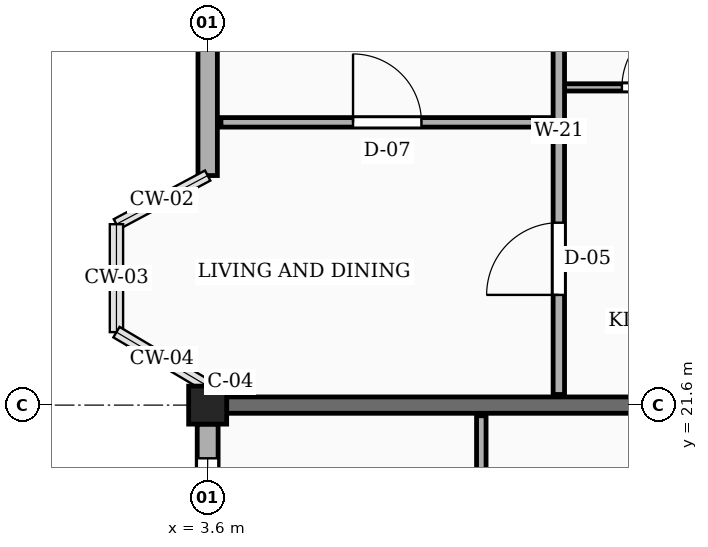
"""IFC4 building model, lengths in metres.
Left out: names, types, materials, properties, quantities, classifications, styles, units other than length and angle.
Written with IfcOpenShell. Run it as: python <this file> out.ifc"""

import sys

from ifc_helpers import new_model, si_unit, direction, frame, frame_2d, origin, origin_2d, place, context, subcontext, project, spatial, rectangle, extrude, element, fill, save


model = new_model("IFC4")
c1 = context("Model", 3, precision=1e-05, world=origin(), true_north=direction((0.0, 1.0)))
c2 = subcontext(c1, "Body", "Model", "MODEL_VIEW")
j1 = project(units=[si_unit("LENGTHUNIT", "METRE"), si_unit("PLANEANGLEUNIT", "RADIAN")], contexts=[c1])
p1 = place(None, origin())
s1 = spatial("IfcSite", under=j1, at=p1, CompositionType="ELEMENT")
p2 = place(p1, origin())
s2 = spatial("IfcBuilding", under=s1, at=p2, CompositionType="ELEMENT")
p3 = place(p2, frame((0.0, 0.0, 32.85)))
s3 = spatial("IfcBuildingStorey", under=s2, at=p3, CompositionType="ELEMENT", Elevation=32.85)
p4 = place(p3, frame((3.6, 21.6, 0.0), z_axis=(0.0, 0.0, 1.0), x_axis=(1.0, 0.0, 0.0)))
e1 = element("IfcColumn", 1, at=p4, inside=s3, PredefinedType="COLUMN", context=c2, shape_type="SweptSolid", body=[
    extrude(rectangle(XDim=0.5, YDim=0.5, at=origin_2d()), origin(), (0.0, 0.0, 1.0), 3.15),
])
p5 = place(p3, frame((3.85, 21.6, 0.0), z_axis=(0.0, 0.0, 1.0), x_axis=(1.0, 0.0, 0.0)))
e2 = element("IfcWall", 2, at=p5, inside=s3, PredefinedType="SOLIDWALL", context=c2, shape_type="SweptSolid", body=[
    extrude(rectangle(XDim=6.75, YDim=0.215, at=frame_2d((3.375, 0.0))), origin(), (0.0, 0.0, 1.0), 2.17),
])
p6 = place(p3, frame((3.6, 28.55, 0.0), z_axis=(0.0, 0.0, 1.0), x_axis=(0.0, -1.0, 0.0)))
e3 = element("IfcWall", 3, at=p6, inside=s3, PredefinedType="SOLIDWALL", context=c2, shape_type="SweptSolid", body=[
    extrude(rectangle(XDim=3.93, YDim=0.255, at=frame_2d((1.965, 0.0))), origin(), (0.0, 0.0, 1.0), 2.44),
])
p7 = place(p6, frame((1.11, 0.0, 0.78)))
e4 = element("IfcOpeningElement", 4, at=p7, cuts=e3, PredefinedType="OPENING", context=c2, shape_type="SweptSolid", body=[
    extrude(rectangle(XDim=1.12, YDim=1.26, at=frame_2d((0.56, 0.63))), frame((0.0, 0.137, 0.0), z_axis=(0.0, -1.0, 0.0), x_axis=(1.0, 0.0, 0.0)), (0.0, 0.0, 1.0), 0.275),
])
p8 = place(p3, frame((3.6, 21.35, 0.0), z_axis=(0.0, 0.0, 1.0), x_axis=(0.0, -1.0, 0.0)))
e5 = element("IfcWall", 5, at=p8, inside=s3, PredefinedType="SOLIDWALL", context=c2, shape_type="SweptSolid", body=[
    extrude(rectangle(XDim=6.7, YDim=0.275, at=frame_2d((3.35, 0.0))), origin(), (0.0, 0.0, 1.0), 2.44),
])
p9 = place(p8, frame((0.45, 0.0, 0.78)))
e6 = element("IfcOpeningElement", 6, at=p9, cuts=e5, PredefinedType="OPENING", context=c2, shape_type="SweptSolid", body=[
    extrude(rectangle(XDim=1.2, YDim=1.26, at=frame_2d((0.6, 0.63))), frame((0.0, 0.147, 0.0), z_axis=(0.0, -1.0, 0.0), x_axis=(1.0, 0.0, 0.0)), (0.0, 0.0, 1.0), 0.295),
])
p10 = place(p8, frame((4.65, 0.0, 0.78)))
e7 = element("IfcOpeningElement", 7, at=p10, cuts=e5, PredefinedType="OPENING", context=c2, shape_type="SweptSolid", body=[
    extrude(rectangle(XDim=1.36, YDim=1.26, at=frame_2d((0.68, 0.63))), frame((0.0, 0.147, 0.0), z_axis=(0.0, -1.0, 0.0), x_axis=(1.0, 0.0, 0.0)), (0.0, 0.0, 1.0), 0.295),
])
p11 = place(p3, frame((7.2, 14.54, 0.0), z_axis=(0.0, 0.0, 1.0), x_axis=(0.0, 1.0, 0.0)))
e8 = element("IfcWall", 8, at=p11, inside=s3, PredefinedType="PARTITIONING", context=c2, shape_type="SweptSolid", body=[
    extrude(rectangle(XDim=6.92, YDim=0.125, at=frame_2d((3.46, 0.0))), origin(), (0.0, 0.0, 1.0), 2.305),
])
p12 = place(p11, frame((1.05, 0.0, 0.0)))
e9 = element("IfcOpeningElement", 9, at=p12, cuts=e8, PredefinedType="OPENING", context=c2, shape_type="SweptSolid", body=[
    extrude(rectangle(XDim=0.87, YDim=2.05, at=frame_2d((0.435, 1.025))), frame((0.0, 0.073, 0.0), z_axis=(0.0, -1.0, 0.0), x_axis=(1.0, 0.0, 0.0)), (0.0, 0.0, 1.0), 0.145),
])
p13 = place(p11, frame((4.45, 0.0, 0.0)))
e10 = element("IfcOpeningElement", 10, at=p13, cuts=e8, PredefinedType="OPENING", context=c2, shape_type="SweptSolid", body=[
    extrude(rectangle(XDim=0.88, YDim=2.08, at=frame_2d((0.44, 1.04))), frame((0.0, 0.073, 0.0), z_axis=(0.0, -1.0, 0.0), x_axis=(1.0, 0.0, 0.0)), (0.0, 0.0, 1.0), 0.145),
])
p14 = place(p3, frame((3.775, 25.32, 0.0), z_axis=(0.0, 0.0, 1.0), x_axis=(1.0, 0.0, 0.0)))
e11 = element("IfcWall", 11, at=p14, inside=s3, PredefinedType="PARTITIONING", context=c2, shape_type="SweptSolid", body=[
    extrude(rectangle(XDim=4.375, YDim=0.125, at=frame_2d((2.188, 0.0))), origin(), (0.0, 0.0, 1.0), 2.305),
])
p15 = place(p14, frame((1.738, 0.0, 0.0)))
e12 = element("IfcOpeningElement", 12, at=p15, cuts=e11, PredefinedType="OPENING", context=c2, shape_type="SweptSolid", body=[
    extrude(rectangle(XDim=0.9, YDim=2.1, at=frame_2d((0.45, 1.05))), frame((0.0, 0.073, 0.0), z_axis=(0.0, -1.0, 0.0), x_axis=(1.0, 0.0, 0.0)), (0.0, 0.0, 1.0), 0.145),
])
p16 = place(p3, frame((8.29, 25.78, 0.0), z_axis=(0.0, 0.0, 1.0), x_axis=(1.0, 0.0, 0.0)))
e13 = element("IfcWall", 13, at=p16, inside=s3, PredefinedType="PARTITIONING", context=c2, shape_type="SweptSolid", body=[
    extrude(rectangle(XDim=2.42, YDim=0.095, at=frame_2d((1.21, 0.0))), origin(), (0.0, 0.0, 1.0), 2.305),
])
p17 = place(p16, frame((0.76, 0.0, 0.0)))
e14 = element("IfcOpeningElement", 14, at=p17, cuts=e13, PredefinedType="OPENING", context=c2, shape_type="SweptSolid", body=[
    extrude(rectangle(XDim=0.9, YDim=2.05, at=frame_2d((0.45, 1.025))), frame((0.0, 0.058, 0.0), z_axis=(0.0, -1.0, 0.0), x_axis=(1.0, 0.0, 0.0)), (0.0, 0.0, 1.0), 0.115),
])
p18 = place(p3, frame((8.22, 21.74, 0.0), z_axis=(0.0, 0.0, 1.0), x_axis=(0.0, 1.0, 0.0)))
e15 = element("IfcWall", 15, at=p18, inside=s3, PredefinedType="PARTITIONING", context=c2, shape_type="SweptSolid", body=[
    extrude(rectangle(XDim=6.92, YDim=0.15, at=frame_2d((3.46, 0.0))), origin(), (0.0, 0.0, 1.0), 2.305),
])
p19 = place(p18, frame((1.31, 0.0, 0.0)))
e16 = element("IfcOpeningElement", 16, at=p19, cuts=e15, PredefinedType="OPENING", context=c2, shape_type="SweptSolid", body=[
    extrude(rectangle(XDim=0.95, YDim=2.1, at=frame_2d((0.475, 1.05))), frame((0.0, 0.085, 0.0), z_axis=(0.0, -1.0, 0.0), x_axis=(1.0, 0.0, 0.0)), (0.0, 0.0, 1.0), 0.17),
])
p20 = place(p9, origin())
e17 = element("IfcWindow", 17, at=p20, inside=s3, PartitioningType="SINGLE_PANEL", PredefinedType="WINDOW", context=c2, shape_type="SweptSolid", body=[
    extrude(rectangle(XDim=1.2, YDim=1.26, at=frame_2d((0.6, 0.63))), frame((0.0, 0.03, 0.0), z_axis=(0.0, -1.0, 0.0), x_axis=(1.0, 0.0, 0.0)), (0.0, 0.0, 1.0), 0.06),
])
fill(e6, e17)
p21 = place(p15, origin())
e18 = element("IfcDoor", 18, at=p21, inside=s3, OperationType="SINGLE_SWING_LEFT", PredefinedType="DOOR", context=c2, shape_type="SweptSolid", body=[
    extrude(rectangle(XDim=0.9, YDim=2.1, at=frame_2d((0.45, 1.05))), frame((0.0, 0.025, 0.0), z_axis=(0.0, -1.0, 0.0), x_axis=(1.0, 0.0, 0.0)), (0.0, 0.0, 1.0), 0.05),
])
fill(e12, e18)
p22 = place(p17, origin())
e19 = element("IfcDoor", 19, at=p22, inside=s3, OperationType="SINGLE_SWING_RIGHT", PredefinedType="DOOR", context=c2, shape_type="SweptSolid", body=[
    extrude(rectangle(XDim=0.9, YDim=2.05, at=frame_2d((0.45, 1.025))), frame((0.0, 0.025, 0.0), z_axis=(0.0, -1.0, 0.0), x_axis=(1.0, 0.0, 0.0)), (0.0, 0.0, 1.0), 0.05),
])
fill(e14, e19)
p23 = place(p19, origin())
e20 = element("IfcDoor", 20, at=p23, inside=s3, OperationType="SINGLE_SWING_LEFT", PredefinedType="DOOR", context=c2, shape_type="SweptSolid", body=[
    extrude(rectangle(XDim=0.95, YDim=2.1, at=frame_2d((0.475, 1.05))), frame((0.0, 0.025, 0.0), z_axis=(0.0, -1.0, 0.0), x_axis=(1.0, 0.0, 0.0)), (0.0, 0.0, 1.0), 0.05),
])
fill(e16, e20)
save(model, sys.argv[1])
